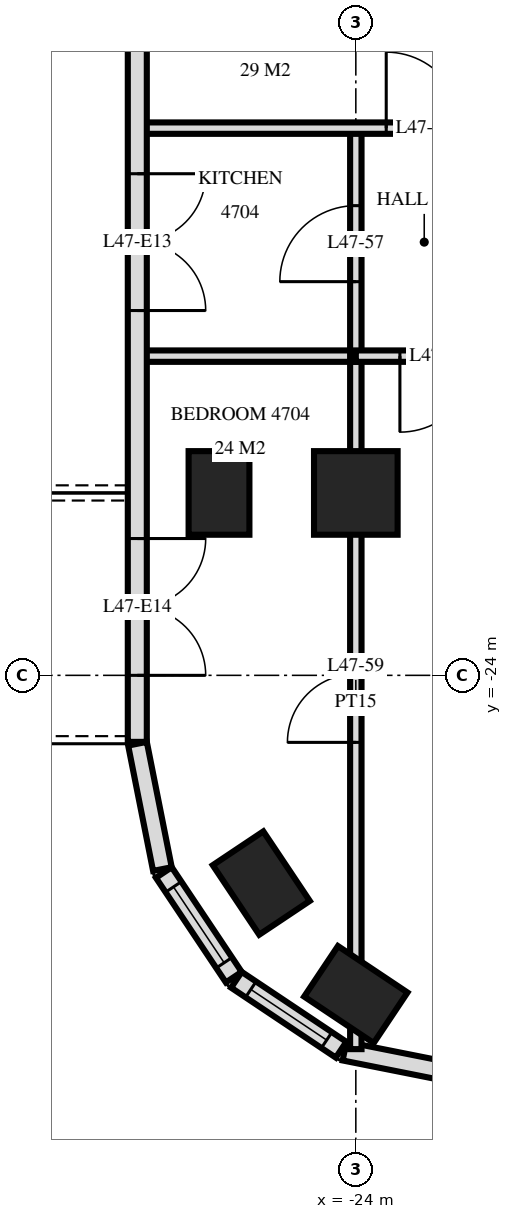
"""IFC4 building model, lengths in metres.
Left out: names, types, materials, properties, quantities, classifications, styles, units other than length and angle.
Written with IfcOpenShell. Run it as: python <this file> out.ifc"""

import sys

from ifc_helpers import new_model, si_unit, direction, frame, frame_2d, origin, origin_2d, place, context, subcontext, project, spatial, rectangle, extrude, element, fill, save


model = new_model("IFC4")
c1 = context("Model", 3, precision=1e-05, world=origin(), true_north=direction((0.0, 1.0)))
c2 = subcontext(c1, "Body", "Model", "MODEL_VIEW")
j1 = project(units=[si_unit("LENGTHUNIT", "METRE"), si_unit("PLANEANGLEUNIT", "RADIAN")], contexts=[c1])
p1 = place(None, origin())
s1 = spatial("IfcSite", under=j1, at=p1, CompositionType="ELEMENT")
p2 = place(p1, origin())
s2 = spatial("IfcBuilding", under=s1, at=p2, CompositionType="ELEMENT")
p3 = place(p2, frame((0.0, 0.0, 183.6)))
s3 = spatial("IfcBuildingStorey", under=s2, at=p3, CompositionType="ELEMENT", Elevation=183.6)
for number, where, z_axis, x_axis in (
    (1, (-25.8, -21.6, -0.28), (0.0, 0.0, 1.0), (0.0, 1.0, 0.0)),
    (2, (-25.244, -26.733, -0.28), (0.0, 0.0, 1.0), (-0.556, 0.831, 0.0)),
    (3, (-24.0, -28.2, -0.28), (0.0, 0.0, 1.0), (-0.831, 0.556, 0.0)),
):
    element("IfcColumn", number, at=place(p3, frame(where, z_axis=z_axis, x_axis=x_axis)), inside=s3, PredefinedType="COLUMN", context=c2, shape_type="SweptSolid", body=[
        extrude(rectangle(XDim=1.1, YDim=0.8, at=origin_2d()), origin(), (0.0, 0.0, 1.0), 3.78),
    ])
p4 = place(p3, frame((-24.0, -21.6, -0.28), z_axis=(0.0, 0.0, 1.0), x_axis=(1.0, 0.0, 0.0)))
e4 = element("IfcColumn", 4, at=p4, inside=s3, PredefinedType="COLUMN", context=c2, shape_type="SweptSolid", body=[
    extrude(rectangle(XDim=1.1, YDim=1.1, at=origin_2d()), origin(), (0.0, 0.0, 1.0), 3.78),
])
p5 = place(p3, frame((-26.875, -3.325, 0.0), z_axis=(0.0, 0.0, 1.0), x_axis=(0.0, -1.0, 0.0)))
e5 = element("IfcWall", 5, at=p5, inside=s3, PredefinedType="SOLIDWALL", context=c2, shape_type="SweptSolid", body=[
    extrude(rectangle(XDim=21.551, YDim=0.25, at=frame_2d((10.775, 0.0))), origin(), (0.0, 0.0, 1.0), 3.22),
])
p6 = place(p5, frame((7.025, 0.0, 0.0)))
e6 = element("IfcOpeningElement", 6, at=p6, cuts=e5, PredefinedType="OPENING", context=c2, shape_type="SweptSolid", body=[
    extrude(rectangle(XDim=1.8, YDim=2.4, at=frame_2d((0.9, 1.2))), frame((0.0, 0.135, 0.0), z_axis=(0.0, -1.0, 0.0), x_axis=(1.0, 0.0, 0.0)), (0.0, 0.0, 1.0), 0.27),
])
p7 = place(p5, frame((14.075, 0.0, 0.0)))
e7 = element("IfcOpeningElement", 7, at=p7, cuts=e5, PredefinedType="OPENING", context=c2, shape_type="SweptSolid", body=[
    extrude(rectangle(XDim=1.8, YDim=2.4, at=frame_2d((0.9, 1.2))), frame((0.0, 0.135, 0.0), z_axis=(0.0, -1.0, 0.0), x_axis=(1.0, 0.0, 0.0)), (0.0, 0.0, 1.0), 0.27),
])
p8 = place(p5, frame((18.875, 0.0, 0.0)))
e8 = element("IfcOpeningElement", 8, at=p8, cuts=e5, PredefinedType="OPENING", context=c2, shape_type="SweptSolid", body=[
    extrude(rectangle(XDim=1.8, YDim=2.4, at=frame_2d((0.9, 1.2))), frame((0.0, 0.135, 0.0), z_axis=(0.0, -1.0, 0.0), x_axis=(1.0, 0.0, 0.0)), (0.0, 0.0, 1.0), 0.27),
])
p9 = place(p3, frame((-26.873, -24.9, 0.0), z_axis=(0.0, 0.0, 1.0), x_axis=(0.195026884138, -0.980797896849, 0.0)))
e9 = element("IfcWall", 9, at=p9, inside=s3, PredefinedType="SOLIDWALL", context=c2, shape_type="SweptSolid", body=[
    extrude(rectangle(XDim=1.681, YDim=0.25, at=frame_2d((0.841, 0.0))), origin(), (0.0, 0.0, 1.0), 3.22),
])
p10 = place(p3, frame((-26.526, -26.594, 0.0), z_axis=(0.0, 0.0, 1.0), x_axis=(0.55555029066, -0.831482937015, 0.0)))
e10 = element("IfcWall", 10, at=p10, inside=s3, PredefinedType="SOLIDWALL", context=c2, shape_type="SweptSolid", body=[
    extrude(rectangle(XDim=1.656, YDim=0.25, at=frame_2d((0.828, 0.0))), origin(), (0.0, 0.0, 1.0), 3.22),
])
p11 = place(p10, frame((0.228, 0.0, 0.9)))
e11 = element("IfcOpeningElement", 11, at=p11, cuts=e10, PredefinedType="OPENING", context=c2, shape_type="SweptSolid", body=[
    extrude(rectangle(XDim=1.2, YDim=1.5, at=frame_2d((0.6, 0.75))), frame((0.0, 0.135, 0.0), z_axis=(0.0, -1.0, 0.0), x_axis=(1.0, 0.0, 0.0)), (0.0, 0.0, 1.0), 0.27),
])
p12 = place(p3, frame((-25.571, -28.006, 0.0), z_axis=(0.0, 0.0, 1.0), x_axis=(0.831482937015, -0.55555029066, 0.0)))
e12 = element("IfcWall", 12, at=p12, inside=s3, PredefinedType="SOLIDWALL", context=c2, shape_type="SweptSolid", body=[
    extrude(rectangle(XDim=1.656, YDim=0.25, at=frame_2d((0.828, 0.0))), origin(), (0.0, 0.0, 1.0), 3.22),
])
p13 = place(p12, frame((0.228, 0.0, 0.9)))
e13 = element("IfcOpeningElement", 13, at=p13, cuts=e12, PredefinedType="OPENING", context=c2, shape_type="SweptSolid", body=[
    extrude(rectangle(XDim=1.2, YDim=1.5, at=frame_2d((0.6, 0.75))), frame((0.0, 0.135, 0.0), z_axis=(0.0, -1.0, 0.0), x_axis=(1.0, 0.0, 0.0)), (0.0, 0.0, 1.0), 0.27),
])
p14 = place(p3, frame((-24.149, -28.945, 0.0), z_axis=(0.0, 0.0, 1.0), x_axis=(0.980775640221, -0.19513878023, 0.0)))
e14 = element("IfcWall", 14, at=p14, inside=s3, PredefinedType="SOLIDWALL", context=c2, shape_type="SweptSolid", body=[
    extrude(rectangle(XDim=1.681, YDim=0.25, at=frame_2d((0.841, 0.0))), origin(), (0.0, 0.0, 1.0), 3.22),
])
p15 = place(p3, frame((-24.0, -19.8, 0.0), z_axis=(0.0, 0.0, 1.0), x_axis=(0.0, 1.0, 0.0)))
e15 = element("IfcWall", 15, at=p15, inside=s3, PredefinedType="PARTITIONING", context=c2, shape_type="SweptSolid", body=[
    extrude(rectangle(XDim=3.0, YDim=0.15, at=frame_2d((1.5, 0.0))), origin(), (0.0, 0.0, 1.0), 3.22),
])
p16 = place(p15, frame((0.98, 0.0, 0.0)))
e16 = element("IfcOpeningElement", 16, at=p16, cuts=e15, PredefinedType="OPENING", context=c2, shape_type="SweptSolid", body=[
    extrude(rectangle(XDim=1.0, YDim=2.1, at=frame_2d((0.5, 1.05))), frame((0.0, 0.085, 0.0), z_axis=(0.0, -1.0, 0.0), x_axis=(1.0, 0.0, 0.0)), (0.0, 0.0, 1.0), 0.17),
])
p17 = place(p3, frame((-24.0, -28.918, 0.0), z_axis=(0.0, 0.0, 1.0), x_axis=(0.0, 1.0, 0.0)))
e17 = element("IfcWall", 17, at=p17, inside=s3, PredefinedType="PARTITIONING", context=c2, shape_type="SweptSolid", body=[
    extrude(rectangle(XDim=9.118, YDim=0.15, at=frame_2d((4.559, 0.0))), origin(), (0.0, 0.0, 1.0), 3.22),
])
p18 = place(p17, frame((4.036, 0.0, 0.0)))
e18 = element("IfcOpeningElement", 18, at=p18, cuts=e17, PredefinedType="OPENING", context=c2, shape_type="SweptSolid", body=[
    extrude(rectangle(XDim=0.9, YDim=2.1, at=frame_2d((0.45, 1.05))), frame((0.0, 0.085, 0.0), z_axis=(0.0, -1.0, 0.0), x_axis=(1.0, 0.0, 0.0)), (0.0, 0.0, 1.0), 0.17),
])
p19 = place(p3, frame((-24.0, -19.8, 0.0), z_axis=(0.0, 0.0, 1.0), x_axis=(1.0, 0.0, 0.0)))
e19 = element("IfcWall", 19, at=p19, inside=s3, PredefinedType="PARTITIONING", context=c2, shape_type="SweptSolid", body=[
    extrude(rectangle(XDim=1.8, YDim=0.15, at=frame_2d((0.9, 0.0))), origin(), (0.0, 0.0, 1.0), 3.22),
])
p20 = place(p19, frame((0.58, 0.0, 0.0)))
e20 = element("IfcOpeningElement", 20, at=p20, cuts=e19, PredefinedType="OPENING", context=c2, shape_type="SweptSolid", body=[
    extrude(rectangle(XDim=1.0, YDim=2.1, at=frame_2d((0.5, 1.05))), frame((0.0, 0.085, 0.0), z_axis=(0.0, -1.0, 0.0), x_axis=(1.0, 0.0, 0.0)), (0.0, 0.0, 1.0), 0.17),
])
p21 = place(p3, frame((-26.82, -19.8, 0.0), z_axis=(0.0, 0.0, 1.0), x_axis=(1.0, 0.0, 0.0)))
e21 = element("IfcWall", 21, at=p21, inside=s3, PredefinedType="PARTITIONING", context=c2, shape_type="SweptSolid", body=[
    extrude(rectangle(XDim=2.82, YDim=0.15, at=frame_2d((1.41, 0.0))), origin(), (0.0, 0.0, 1.0), 3.22),
])
p22 = place(p3, frame((-26.82, -16.8, 0.0), z_axis=(0.0, 0.0, 1.0), x_axis=(1.0, 0.0, 0.0)))
e22 = element("IfcWall", 22, at=p22, inside=s3, PredefinedType="PARTITIONING", context=c2, shape_type="SweptSolid", body=[
    extrude(rectangle(XDim=53.64, YDim=0.15, at=frame_2d((26.82, 0.0))), origin(), (0.0, 0.0, 1.0), 3.22),
])
p23 = place(p22, frame((11.97, 0.0, 0.0)))
e23 = element("IfcOpeningElement", 23, at=p23, cuts=e22, PredefinedType="OPENING", context=c2, shape_type="SweptSolid", body=[
    extrude(rectangle(XDim=1.0, YDim=2.1, at=frame_2d((0.5, 1.05))), frame((0.0, 0.085, 0.0), z_axis=(0.0, -1.0, 0.0), x_axis=(1.0, 0.0, 0.0)), (0.0, 0.0, 1.0), 0.17),
])
p24 = place(p22, frame((10.67, 0.0, 0.0)))
e24 = element("IfcOpeningElement", 24, at=p24, cuts=e22, PredefinedType="OPENING", context=c2, shape_type="SweptSolid", body=[
    extrude(rectangle(XDim=1.0, YDim=2.1, at=frame_2d((0.5, 1.05))), frame((0.0, 0.085, 0.0), z_axis=(0.0, -1.0, 0.0), x_axis=(1.0, 0.0, 0.0)), (0.0, 0.0, 1.0), 0.17),
])
p25 = place(p22, frame((3.22, 0.0, 0.0)))
e25 = element("IfcOpeningElement", 25, at=p25, cuts=e22, PredefinedType="OPENING", context=c2, shape_type="SweptSolid", body=[
    extrude(rectangle(XDim=1.0, YDim=2.1, at=frame_2d((0.5, 1.05))), frame((0.0, 0.085, 0.0), z_axis=(0.0, -1.0, 0.0), x_axis=(1.0, 0.0, 0.0)), (0.0, 0.0, 1.0), 0.17),
])
p26 = place(p22, frame((5.02, 0.0, 0.0)))
e26 = element("IfcOpeningElement", 26, at=p26, cuts=e22, PredefinedType="OPENING", context=c2, shape_type="SweptSolid", body=[
    extrude(rectangle(XDim=1.0, YDim=2.1, at=frame_2d((0.5, 1.05))), frame((0.0, 0.085, 0.0), z_axis=(0.0, -1.0, 0.0), x_axis=(1.0, 0.0, 0.0)), (0.0, 0.0, 1.0), 0.17),
])
p27 = place(p22, frame((38.97, 0.0, 0.0)))
e27 = element("IfcOpeningElement", 27, at=p27, cuts=e22, PredefinedType="OPENING", context=c2, shape_type="SweptSolid", body=[
    extrude(rectangle(XDim=1.0, YDim=2.1, at=frame_2d((0.5, 1.05))), frame((0.0, 0.085, 0.0), z_axis=(0.0, -1.0, 0.0), x_axis=(1.0, 0.0, 0.0)), (0.0, 0.0, 1.0), 0.17),
])
p28 = place(p22, frame((48.72, 0.0, 0.0)))
e28 = element("IfcOpeningElement", 28, at=p28, cuts=e22, PredefinedType="OPENING", context=c2, shape_type="SweptSolid", body=[
    extrude(rectangle(XDim=1.0, YDim=2.1, at=frame_2d((0.5, 1.05))), frame((0.0, 0.085, 0.0), z_axis=(0.0, -1.0, 0.0), x_axis=(1.0, 0.0, 0.0)), (0.0, 0.0, 1.0), 0.17),
])
p29 = place(p22, frame((46.92, 0.0, 0.0)))
e29 = element("IfcOpeningElement", 29, at=p29, cuts=e22, PredefinedType="OPENING", context=c2, shape_type="SweptSolid", body=[
    extrude(rectangle(XDim=1.0, YDim=2.1, at=frame_2d((0.5, 1.05))), frame((0.0, 0.085, 0.0), z_axis=(0.0, -1.0, 0.0), x_axis=(1.0, 0.0, 0.0)), (0.0, 0.0, 1.0), 0.17),
])
p30 = place(p22, frame((18.32, 0.0, 0.0)))
e30 = element("IfcOpeningElement", 30, at=p30, cuts=e22, PredefinedType="OPENING", context=c2, shape_type="SweptSolid", body=[
    extrude(rectangle(XDim=1.0, YDim=2.1, at=frame_2d((0.5, 1.05))), frame((0.0, 0.085, 0.0), z_axis=(0.0, -1.0, 0.0), x_axis=(1.0, 0.0, 0.0)), (0.0, 0.0, 1.0), 0.17),
])
p31 = place(p22, frame((26.32, 0.0, 0.0)))
e31 = element("IfcOpeningElement", 31, at=p31, cuts=e22, PredefinedType="OPENING", context=c2, shape_type="SweptSolid", body=[
    extrude(rectangle(XDim=1.0, YDim=2.1, at=frame_2d((0.5, 1.05))), frame((0.0, 0.085, 0.0), z_axis=(0.0, -1.0, 0.0), x_axis=(1.0, 0.0, 0.0)), (0.0, 0.0, 1.0), 0.17),
])
p32 = place(p22, frame((34.32, 0.0, 0.0)))
e32 = element("IfcOpeningElement", 32, at=p32, cuts=e22, PredefinedType="OPENING", context=c2, shape_type="SweptSolid", body=[
    extrude(rectangle(XDim=1.0, YDim=2.1, at=frame_2d((0.5, 1.05))), frame((0.0, 0.085, 0.0), z_axis=(0.0, -1.0, 0.0), x_axis=(1.0, 0.0, 0.0)), (0.0, 0.0, 1.0), 0.17),
])
p33 = place(p11, origin())
e33 = element("IfcWindow", 33, at=p33, inside=s3, PartitioningType="SINGLE_PANEL", PredefinedType="WINDOW", context=c2, shape_type="SweptSolid", body=[
    extrude(rectangle(XDim=1.2, YDim=1.5, at=frame_2d((0.6, 0.75))), frame((0.0, 0.03, 0.0), z_axis=(0.0, -1.0, 0.0), x_axis=(1.0, 0.0, 0.0)), (0.0, 0.0, 1.0), 0.06),
])
fill(e11, e33)
p34 = place(p13, origin())
e34 = element("IfcWindow", 34, at=p34, inside=s3, PartitioningType="SINGLE_PANEL", PredefinedType="WINDOW", context=c2, shape_type="SweptSolid", body=[
    extrude(rectangle(XDim=1.2, YDim=1.5, at=frame_2d((0.6, 0.75))), frame((0.0, 0.03, 0.0), z_axis=(0.0, -1.0, 0.0), x_axis=(1.0, 0.0, 0.0)), (0.0, 0.0, 1.0), 0.06),
])
fill(e13, e34)
p35 = place(p7, origin())
e35 = element("IfcDoor", 35, at=p35, inside=s3, OperationType="DOUBLE_DOOR_SINGLE_SWING", PredefinedType="DOOR", context=c2, shape_type="SweptSolid", body=[
    extrude(rectangle(XDim=1.8, YDim=2.4, at=frame_2d((0.9, 1.2))), frame((0.0, 0.025, 0.0), z_axis=(0.0, -1.0, 0.0), x_axis=(1.0, 0.0, 0.0)), (0.0, 0.0, 1.0), 0.05),
])
fill(e7, e35)
p36 = place(p8, origin())
e36 = element("IfcDoor", 36, at=p36, inside=s3, OperationType="DOUBLE_DOOR_SINGLE_SWING", PredefinedType="DOOR", context=c2, shape_type="SweptSolid", body=[
    extrude(rectangle(XDim=1.8, YDim=2.4, at=frame_2d((0.9, 1.2))), frame((0.0, 0.025, 0.0), z_axis=(0.0, -1.0, 0.0), x_axis=(1.0, 0.0, 0.0)), (0.0, 0.0, 1.0), 0.05),
])
fill(e8, e36)
p37 = place(p25, origin())
e37 = element("IfcDoor", 37, at=p37, inside=s3, OperationType="SINGLE_SWING_RIGHT", PredefinedType="DOOR", context=c2, shape_type="SweptSolid", body=[
    extrude(rectangle(XDim=1.0, YDim=2.1, at=frame_2d((0.5, 1.05))), frame((0.0, 0.025, 0.0), z_axis=(0.0, -1.0, 0.0), x_axis=(1.0, 0.0, 0.0)), (0.0, 0.0, 1.0), 0.05),
])
fill(e25, e37)
p38 = place(p16, origin())
e38 = element("IfcDoor", 38, at=p38, inside=s3, OperationType="SINGLE_SWING_RIGHT", PredefinedType="DOOR", context=c2, shape_type="SweptSolid", body=[
    extrude(rectangle(XDim=1.0, YDim=2.1, at=frame_2d((0.5, 1.05))), frame((0.0, 0.025, 0.0), z_axis=(0.0, -1.0, 0.0), x_axis=(1.0, 0.0, 0.0)), (0.0, 0.0, 1.0), 0.05),
])
fill(e16, e38)
p39 = place(p20, frame((0.5, 0.0, 0.0), z_axis=(0.0, 0.0, 1.0), x_axis=(-1.0, 0.0, 0.0)))
e39 = element("IfcDoor", 39, at=p39, inside=s3, OperationType="SINGLE_SWING_LEFT", PredefinedType="DOOR", context=c2, shape_type="SweptSolid", body=[
    extrude(rectangle(XDim=1.0, YDim=2.1, at=frame_2d((0.0, 1.05))), frame((0.0, -0.025, 0.0), z_axis=(0.0, 1.0, 0.0), x_axis=(-1.0, 0.0, 0.0)), (0.0, 0.0, 1.0), 0.05),
])
fill(e20, e39)
p40 = place(p18, origin())
e40 = element("IfcDoor", 40, at=p40, inside=s3, OperationType="SINGLE_SWING_RIGHT", PredefinedType="DOOR", context=c2, shape_type="SweptSolid", body=[
    extrude(rectangle(XDim=0.9, YDim=2.1, at=frame_2d((0.45, 1.05))), frame((0.0, 0.025, 0.0), z_axis=(0.0, -1.0, 0.0), x_axis=(1.0, 0.0, 0.0)), (0.0, 0.0, 1.0), 0.05),
])
fill(e18, e40)
save(model, sys.argv[1])
